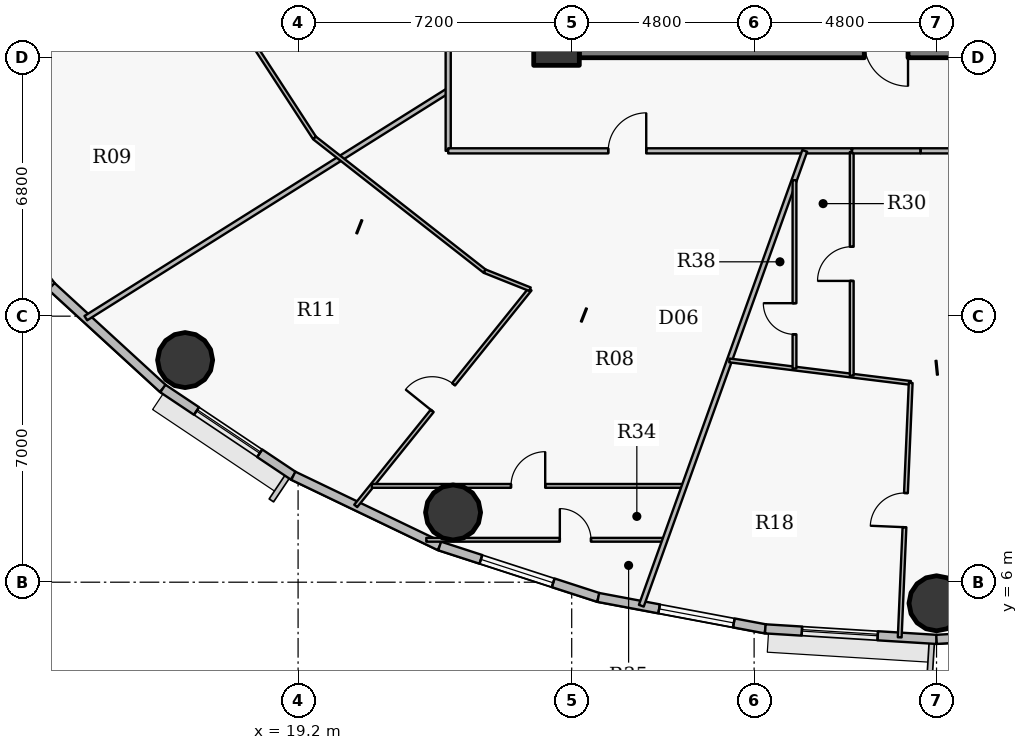
"""IFC4 building model, lengths in metres.
Left out: names, types, materials, properties, quantities, classifications, styles, units other than length and angle.
Written with IfcOpenShell. Run it as: python <this file> out.ifc"""

import sys

from ifc_helpers import new_model, si_unit, direction, frame, frame_2d, origin, origin_2d, place, context, subcontext, project, spatial, rectangle, hollow_circle, extrude, source, transform, mapped, element, fill, save


model = new_model("IFC4")
c1 = context("Model", 3, precision=1e-05, world=origin(), true_north=direction((0.0, 1.0)))
c2 = subcontext(c1, "Body", "Model", "MODEL_VIEW")
j1 = project(units=[si_unit("LENGTHUNIT", "METRE"), si_unit("PLANEANGLEUNIT", "RADIAN")], contexts=[c1])
p1 = place(None, origin())
s1 = spatial("IfcSite", under=j1, at=p1, CompositionType="ELEMENT")
p2 = place(p1, origin())
s2 = spatial("IfcBuilding", under=s1, at=p2, CompositionType="ELEMENT")
p3 = place(p2, frame((0.0, 0.0, 115.95)))
s3 = spatial("IfcBuildingStorey", under=s2, at=p3, CompositionType="ELEMENT", Elevation=115.95)
p4 = place(p3, frame((26.0, 20.2, 0.0), z_axis=(0.0, 0.0, 1.0), x_axis=(1.0, 0.0, 0.0)))
e1 = element("IfcColumn", 1, at=p4, inside=s3, PredefinedType="COLUMN", context=c2, shape_type="SweptSolid", body=[
    extrude(rectangle(XDim=1.2, YDim=1.2, at=origin_2d()), origin(), (0.0, 0.0, 1.0), 3.75),
])
p5 = place(p3, frame((45.4, 20.2, 0.0), z_axis=(0.0, 0.0, 1.0), x_axis=(-1.0, 0.0, 0.0)))
e2 = element("IfcWall", 2, at=p5, inside=s3, PredefinedType="SHEAR", context=c2, shape_type="SweptSolid", body=[
    extrude(rectangle(XDim=18.8, YDim=0.8, at=frame_2d((9.4, 0.0))), origin(), (0.0, 0.0, 1.0), 2.95),
])
p6 = place(p5, frame((10.15, 0.0, 0.0)))
e3 = element("IfcOpeningElement", 3, at=p6, cuts=e2, PredefinedType="OPENING", context=c2, shape_type="SweptSolid", body=[
    extrude(rectangle(XDim=1.15, YDim=2.15, at=origin_2d()), frame((0.575, 0.41, 1.075), z_axis=(0.0, -1.0, 0.0), x_axis=(1.0, 0.0, 0.0)), (0.0, 0.0, 1.0), 0.82),
])
for number, where, z_axis, x_axis in (
    (4, (16.227, 11.844, 0.0), (0.0, 0.0, 1.0), (1.0, 0.0, 0.0)),
    (5, (23.278, 7.835, 0.0), (0.0, 0.0, 1.0), (1.0, 0.0, 0.0)),
    (6, (36.0, 5.445, 0.0), (0.0, 0.0, 1.0), (1.0, 0.0, 0.0)),
):
    element("IfcColumn", number, at=place(p3, frame(where, z_axis=z_axis, x_axis=x_axis)), inside=s3, PredefinedType="COLUMN", context=c2, shape_type="SweptSolid", body=[
        extrude(hollow_circle(Radius=0.725, WallThickness=0.042, at=origin_2d()), origin(), (0.0, 0.0, 1.0), 3.75),
    ])
p7 = place(p3, frame((12.711, 13.783, 0.0), z_axis=(0.0, 0.0, 1.0), x_axis=(-0.616272103517, 0.787533297345, 0.0)))
e7 = element("IfcWall", 7, at=p7, inside=s3, PredefinedType="SOLIDWALL", context=c2, shape_type="SweptSolid", body=[
    extrude(rectangle(XDim=3.823, YDim=0.24, at=frame_2d((1.912, 0.0))), origin(), (0.0, 0.0, 1.0), 3.5),
])
p8 = place(p7, frame((0.912, 0.0, 0.9)))
e8 = element("IfcOpeningElement", 8, at=p8, cuts=e7, PredefinedType="OPENING", context=c2, shape_type="SweptSolid", body=[
    extrude(rectangle(XDim=2.0, YDim=1.75, at=origin_2d()), frame((1.0, 0.13, 0.875), z_axis=(0.0, -1.0, 0.0), x_axis=(1.0, 0.0, 0.0)), (0.0, 0.0, 1.0), 0.26),
])
p9 = place(p3, frame((15.642, 11.097, 0.0), z_axis=(0.0, 0.0, 1.0), x_axis=(-0.737113356241, 0.675769117414, 0.0)))
e9 = element("IfcWall", 9, at=p9, inside=s3, PredefinedType="SOLIDWALL", context=c2, shape_type="SweptSolid", body=[
    extrude(rectangle(XDim=3.976, YDim=0.24, at=frame_2d((1.988, 0.0))), origin(), (0.0, 0.0, 1.0), 3.5),
])
p10 = place(p3, frame((19.075, 8.801, 0.0), z_axis=(0.0, 0.0, 1.0), x_axis=(-0.831221811447, 0.555940914284, 0.0)))
e10 = element("IfcWall", 10, at=p10, inside=s3, PredefinedType="SOLIDWALL", context=c2, shape_type="SweptSolid", body=[
    extrude(rectangle(XDim=4.13, YDim=0.24, at=frame_2d((2.065, 0.0))), origin(), (0.0, 0.0, 1.0), 3.5),
])
p11 = place(p10, frame((1.065, 0.0, 0.9)))
e11 = element("IfcOpeningElement", 11, at=p11, cuts=e10, PredefinedType="OPENING", context=c2, shape_type="SweptSolid", body=[
    extrude(rectangle(XDim=2.0, YDim=1.75, at=origin_2d()), frame((1.0, 0.13, 0.875), z_axis=(0.0, -1.0, 0.0), x_axis=(1.0, 0.0, 0.0)), (0.0, 0.0, 1.0), 0.26),
])
p12 = place(p3, frame((22.926, 6.953, 0.0), z_axis=(0.0, 0.0, 1.0), x_axis=(-0.901589935876, 0.432591709962, 0.0)))
e12 = element("IfcWall", 12, at=p12, inside=s3, PredefinedType="SOLIDWALL", context=c2, shape_type="SweptSolid", body=[
    extrude(rectangle(XDim=4.272, YDim=0.24, at=frame_2d((2.136, 0.0))), origin(), (0.0, 0.0, 1.0), 3.5),
])
p13 = place(p3, frame((27.1, 5.599, 0.0), z_axis=(0.0, 0.0, 1.0), x_axis=(-0.951211346073, 0.308540070495, 0.0)))
e13 = element("IfcWall", 13, at=p13, inside=s3, PredefinedType="SOLIDWALL", context=c2, shape_type="SweptSolid", body=[
    extrude(rectangle(XDim=4.388, YDim=0.24, at=frame_2d((2.194, 0.0))), origin(), (0.0, 0.0, 1.0), 3.5),
])
p14 = place(p13, frame((1.248, 0.0, 0.9)))
e14 = element("IfcOpeningElement", 14, at=p14, cuts=e13, PredefinedType="OPENING", context=c2, shape_type="SweptSolid", body=[
    extrude(rectangle(XDim=2.0, YDim=1.75, at=origin_2d()), frame((1.0, 0.13, 0.875), z_axis=(0.0, -1.0, 0.0), x_axis=(1.0, 0.0, 0.0)), (0.0, 0.0, 1.0), 0.26),
])
p15 = place(p3, frame((31.494, 4.773, 0.0), z_axis=(0.0, 0.0, 1.0), x_axis=(-0.982789252177, 0.184730305596, 0.0)))
e15 = element("IfcWall", 15, at=p15, inside=s3, PredefinedType="SOLIDWALL", context=c2, shape_type="SweptSolid", body=[
    extrude(rectangle(XDim=4.471, YDim=0.24, at=frame_2d((2.235, 0.0))), origin(), (0.0, 0.0, 1.0), 3.5),
])
p16 = place(p15, frame((0.843, 0.0, 0.9)))
e16 = element("IfcOpeningElement", 16, at=p16, cuts=e15, PredefinedType="OPENING", context=c2, shape_type="SweptSolid", body=[
    extrude(rectangle(XDim=2.0, YDim=1.75, at=origin_2d()), frame((1.0, 0.13, 0.875), z_axis=(0.0, -1.0, 0.0), x_axis=(1.0, 0.0, 0.0)), (0.0, 0.0, 1.0), 0.26),
])
p17 = place(p3, frame((36.0, 4.495, 0.0), z_axis=(0.0, 0.0, 1.0), x_axis=(-0.998107531589, 0.061492726276, 0.0)))
e17 = element("IfcWall", 17, at=p17, inside=s3, PredefinedType="SOLIDWALL", context=c2, shape_type="SweptSolid", body=[
    extrude(rectangle(XDim=4.514, YDim=0.24, at=frame_2d((2.257, 0.0))), origin(), (0.0, 0.0, 1.0), 3.5),
])
p18 = place(p17, frame((1.55, 0.0, 0.9)))
e18 = element("IfcOpeningElement", 18, at=p18, cuts=e17, PredefinedType="OPENING", context=c2, shape_type="SweptSolid", body=[
    extrude(rectangle(XDim=2.0, YDim=1.75, at=origin_2d()), frame((1.0, 0.13, 0.875), z_axis=(0.0, -1.0, 0.0), x_axis=(1.0, 0.0, 0.0)), (0.0, 0.0, 1.0), 0.26),
])
p19 = place(p3, frame((40.506, 4.773, 0.0), z_axis=(0.0, 0.0, 1.0), x_axis=(-0.998107531589, -0.061492726276, 0.0)))
e19 = element("IfcWall", 19, at=p19, inside=s3, PredefinedType="SOLIDWALL", context=c2, shape_type="SweptSolid", body=[
    extrude(rectangle(XDim=4.514, YDim=0.24, at=frame_2d((2.257, 0.0))), origin(), (0.0, 0.0, 1.0), 3.5),
])
p20 = place(p19, frame((1.257, 0.0, 0.9)))
e20 = element("IfcOpeningElement", 20, at=p20, cuts=e19, PredefinedType="OPENING", context=c2, shape_type="SweptSolid", body=[
    extrude(rectangle(XDim=2.0, YDim=1.75, at=origin_2d()), frame((1.0, 0.13, 0.875), z_axis=(0.0, -1.0, 0.0), x_axis=(1.0, 0.0, 0.0)), (0.0, 0.0, 1.0), 0.26),
])
p21 = place(p3, frame((8.763, 19.792, 0.0), z_axis=(0.0, 0.0, 1.0), x_axis=(0.96671793708, 0.255844542893, 0.0)))
e21 = element("IfcWall", 21, at=p21, inside=s3, PredefinedType="PARTITIONING", context=c2, shape_type="SweptSolid", body=[
    extrude(rectangle(XDim=8.385, YDim=0.1, at=frame_2d((4.192, 0.0))), origin(), (0.0, 0.0, 1.0), 2.935),
])
p22 = place(p21, frame((4.835, 0.0, 0.0)))
e22 = element("IfcOpeningElement", 22, at=p22, cuts=e21, PredefinedType="OPENING", context=c2, shape_type="SweptSolid", body=[
    extrude(rectangle(XDim=0.9, YDim=2.1, at=origin_2d()), frame((0.45, 0.06, 1.05), z_axis=(0.0, -1.0, 0.0), x_axis=(1.0, 0.0, 0.0)), (0.0, 0.0, 1.0), 0.12),
])
p23 = place(p3, frame((13.615, 12.948, 0.0), z_axis=(0.0, 0.0, 1.0), x_axis=(0.846963568038, 0.531650932866, 0.0)))
e23 = element("IfcWall", 23, at=p23, inside=s3, PredefinedType="PARTITIONING", context=c2, shape_type="SweptSolid", body=[
    extrude(rectangle(XDim=11.258, YDim=0.135, at=frame_2d((5.629, 0.0))), origin(), (0.0, 0.0, 1.0), 2.935),
])
p24 = place(p3, frame((16.869, 21.937, 0.0), z_axis=(0.0, 0.0, 1.0), x_axis=(0.545394651961, -0.838179380331, 0.0)))
e24 = element("IfcWall", 24, at=p24, inside=s3, PredefinedType="PARTITIONING", context=c2, shape_type="SweptSolid", body=[
    extrude(rectangle(XDim=5.068, YDim=0.1, at=frame_2d((2.534, 0.0))), origin(), (0.0, 0.0, 1.0), 3.5),
])
p25 = place(p3, frame((19.634, 17.689, 0.0), z_axis=(0.0, 0.0, 1.0), x_axis=(0.787333679705, -0.616527109544, 0.0)))
e25 = element("IfcWall", 25, at=p25, inside=s3, PredefinedType="PARTITIONING", context=c2, shape_type="SweptSolid", body=[
    extrude(rectangle(XDim=5.685, YDim=0.1, at=frame_2d((2.842, 0.0))), origin(), (0.0, 0.0, 1.0), 2.935),
])
p26 = place(p3, frame((20.717, 8.007, 0.0), z_axis=(0.0, 0.0, 1.0), x_axis=(0.626926430663, 0.779078462375, 0.0)))
e26 = element("IfcWall", 26, at=p26, inside=s3, PredefinedType="PARTITIONING", context=c2, shape_type="SweptSolid", body=[
    extrude(rectangle(XDim=7.317, YDim=0.1, at=frame_2d((3.658, 0.0))), origin(), (0.0, 0.0, 1.0), 2.935),
])
p27 = place(p26, frame((3.208, 0.0, 0.0)))
e27 = element("IfcOpeningElement", 27, at=p27, cuts=e26, PredefinedType="OPENING", context=c2, shape_type="SweptSolid", body=[
    extrude(rectangle(XDim=0.9, YDim=2.1, at=origin_2d()), frame((0.45, 0.06, 1.05), z_axis=(0.0, -1.0, 0.0), x_axis=(1.0, 0.0, 0.0)), (0.0, 0.0, 1.0), 0.12),
])
p28 = place(p3, frame((21.141, 8.534, 0.0), z_axis=(0.0, 0.0, 1.0), x_axis=(1.0, 0.0, 0.0)))
e28 = element("IfcWall", 28, at=p28, inside=s3, PredefinedType="PARTITIONING", context=c2, shape_type="SweptSolid", body=[
    extrude(rectangle(XDim=8.224, YDim=0.1, at=frame_2d((4.112, 0.0))), origin(), (0.0, 0.0, 1.0), 2.935),
])
p29 = place(p28, frame((3.662, 0.0, 0.0)))
e29 = element("IfcOpeningElement", 29, at=p29, cuts=e28, PredefinedType="OPENING", context=c2, shape_type="SweptSolid", body=[
    extrude(rectangle(XDim=0.9, YDim=2.1, at=origin_2d()), frame((0.45, 0.06, 1.05), z_axis=(0.0, -1.0, 0.0), x_axis=(1.0, 0.0, 0.0)), (0.0, 0.0, 1.0), 0.12),
])
p30 = place(p3, frame((22.574, 7.116, 0.0), z_axis=(0.0, 0.0, 1.0), x_axis=(1.0, 0.0, 0.0)))
e30 = element("IfcWall", 30, at=p30, inside=s3, PredefinedType="PARTITIONING", context=c2, shape_type="SweptSolid", body=[
    extrude(rectangle(XDim=6.281, YDim=0.1, at=frame_2d((3.141, 0.0))), origin(), (0.0, 0.0, 1.0), 2.935),
])
p31 = place(p30, frame((3.514, 0.0, 0.0)))
e31 = element("IfcOpeningElement", 31, at=p31, cuts=e30, PredefinedType="OPENING", context=c2, shape_type="SweptSolid", body=[
    extrude(rectangle(XDim=0.82, YDim=2.1, at=origin_2d()), frame((0.41, 0.06, 1.05), z_axis=(0.0, -1.0, 0.0), x_axis=(1.0, 0.0, 0.0)), (0.0, 0.0, 1.0), 0.12),
])
p32 = place(p3, frame((23.15, 17.35, 0.0), z_axis=(0.0, 0.0, 1.0), x_axis=(0.0, 1.0, 0.0)))
e32 = element("IfcWall", 32, at=p32, inside=s3, PredefinedType="PARTITIONING", context=c2, shape_type="SweptSolid", body=[
    extrude(rectangle(XDim=19.3, YDim=0.135, at=frame_2d((9.65, 0.0))), origin(), (0.0, 0.0, 1.0), 2.935),
])
p33 = place(p32, frame((16.264, 0.0, 0.0)))
e33 = element("IfcOpeningElement", 33, at=p33, cuts=e32, PredefinedType="OPENING", context=c2, shape_type="SweptSolid", body=[
    extrude(rectangle(XDim=1.0, YDim=2.15, at=origin_2d()), frame((0.5, 0.078, 1.075), z_axis=(0.0, -1.0, 0.0), x_axis=(1.0, 0.0, 0.0)), (0.0, 0.0, 1.0), 0.155),
])
p34 = place(p32, frame((7.426, 0.0, 0.0)))
e34 = element("IfcOpeningElement", 34, at=p34, cuts=e32, PredefinedType="OPENING", context=c2, shape_type="SweptSolid", body=[
    extrude(rectangle(XDim=1.0, YDim=2.15, at=origin_2d()), frame((0.5, 0.078, 1.075), z_axis=(0.0, -1.0, 0.0), x_axis=(1.0, 0.0, 0.0)), (0.0, 0.0, 1.0), 0.155),
])
p35 = place(p3, frame((23.15, 17.35, 0.0), z_axis=(0.0, 0.0, 1.0), x_axis=(1.0, 0.0, 0.0)))
e35 = element("IfcWall", 35, at=p35, inside=s3, PredefinedType="PARTITIONING", context=c2, shape_type="SweptSolid", body=[
    extrude(rectangle(XDim=10.619, YDim=0.135, at=frame_2d((5.31, 0.0))), origin(), (0.0, 0.0, 1.0), 2.935),
])
p36 = place(p35, frame((4.211, 0.0, 0.0)))
e36 = element("IfcOpeningElement", 36, at=p36, cuts=e35, PredefinedType="OPENING", context=c2, shape_type="SweptSolid", body=[
    extrude(rectangle(XDim=1.0, YDim=2.15, at=origin_2d()), frame((0.5, 0.078, 1.075), z_axis=(0.0, -1.0, 0.0), x_axis=(1.0, 0.0, 0.0)), (0.0, 0.0, 1.0), 0.155),
])
p37 = place(p3, frame((24.109, 14.184, 0.0), z_axis=(0.0, 0.0, 1.0), x_axis=(0.928816677888, -0.370539578017, 0.0)))
e37 = element("IfcWall", 37, at=p37, inside=s3, PredefinedType="PARTITIONING", context=c2, shape_type="SweptSolid", body=[
    extrude(rectangle(XDim=1.286, YDim=0.1, at=frame_2d((0.643, 0.0))), origin(), (0.0, 0.0, 1.0), 3.185),
])
p38 = place(p3, frame((28.232, 5.381, 0.0), z_axis=(0.0, 0.0, 1.0), x_axis=(0.338158615332, 0.941089130145, 0.0)))
e38 = element("IfcWall", 38, at=p38, inside=s3, PredefinedType="PARTITIONING", context=c2, shape_type="SweptSolid", body=[
    extrude(rectangle(XDim=12.718, YDim=0.135, at=frame_2d((6.359, 0.0))), origin(), (0.0, 0.0, 1.0), 2.935),
])
p39 = place(p3, frame((30.551, 11.835, 0.0), z_axis=(0.0, 0.0, 1.0), x_axis=(0.992401646286, -0.123040531728, 0.0)))
e39 = element("IfcWall", 39, at=p39, inside=s3, PredefinedType="PARTITIONING", context=c2, shape_type="SweptSolid", body=[
    extrude(rectangle(XDim=4.806, YDim=0.1, at=frame_2d((2.403, 0.0))), origin(), (0.0, 0.0, 1.0), 3.5),
])
p40 = place(p3, frame((32.262, 11.623, 0.0), z_axis=(0.0, 0.0, 1.0), x_axis=(0.0, 1.0, 0.0)))
e40 = element("IfcWall", 40, at=p40, inside=s3, PredefinedType="PARTITIONING", context=c2, shape_type="SweptSolid", body=[
    extrude(rectangle(XDim=4.955, YDim=0.1, at=frame_2d((2.478, 0.0))), origin(), (0.0, 0.0, 1.0), 3.5),
])
p41 = place(p40, frame((0.899, 0.0, 0.0)))
e41 = element("IfcOpeningElement", 41, at=p41, cuts=e40, PredefinedType="OPENING", context=c2, shape_type="SweptSolid", body=[
    extrude(rectangle(XDim=0.82, YDim=2.1, at=origin_2d()), frame((0.41, 0.06, 1.05), z_axis=(0.0, -1.0, 0.0), x_axis=(1.0, 0.0, 0.0)), (0.0, 0.0, 1.0), 0.12),
])
p42 = place(p3, frame((33.769, 11.436, 0.0), z_axis=(0.0, 0.0, 1.0), x_axis=(0.0, 1.0, 0.0)))
e42 = element("IfcWall", 42, at=p42, inside=s3, PredefinedType="PARTITIONING", context=c2, shape_type="SweptSolid", body=[
    extrude(rectangle(XDim=5.884, YDim=0.1, at=frame_2d((2.942, 0.0))), origin(), (0.0, 0.0, 1.0), 3.5),
])
p43 = place(p42, frame((2.492, 0.0, 0.0)))
e43 = element("IfcOpeningElement", 43, at=p43, cuts=e42, PredefinedType="OPENING", context=c2, shape_type="SweptSolid", body=[
    extrude(rectangle(XDim=0.9, YDim=2.1, at=origin_2d()), frame((0.45, 0.06, 1.05), z_axis=(0.0, -1.0, 0.0), x_axis=(1.0, 0.0, 0.0)), (0.0, 0.0, 1.0), 0.12),
])
p44 = place(p3, frame((35.031, 4.55, 0.0), z_axis=(0.0, 0.0, 1.0), x_axis=(0.043108301027, 0.999070405118, 0.0)))
e44 = element("IfcWall", 44, at=p44, inside=s3, PredefinedType="PARTITIONING", context=c2, shape_type="SweptSolid", body=[
    extrude(rectangle(XDim=6.7, YDim=0.1, at=frame_2d((3.35, 0.0))), origin(), (0.0, 0.0, 1.0), 2.935),
])
p45 = place(p44, frame((2.9, 0.0, 0.0)))
e45 = element("IfcOpeningElement", 45, at=p45, cuts=e44, PredefinedType="OPENING", context=c2, shape_type="SweptSolid", body=[
    extrude(rectangle(XDim=0.9, YDim=2.1, at=origin_2d()), frame((0.45, 0.06, 1.05), z_axis=(0.0, -1.0, 0.0), x_axis=(1.0, 0.0, 0.0)), (0.0, 0.0, 1.0), 0.12),
])
p46 = place(p3, frame((35.584, 17.35, 0.0), z_axis=(0.0, 0.0, 1.0), x_axis=(1.0, 0.0, 0.0)))
e46 = element("IfcWall", 46, at=p46, inside=s3, PredefinedType="PARTITIONING", context=c2, shape_type="SweptSolid", body=[
    extrude(rectangle(XDim=13.266, YDim=0.135, at=frame_2d((6.633, 0.0))), origin(), (0.0, 0.0, 1.0), 2.935),
])
p47 = place(p46, frame((2.757, 0.0, 0.0)))
e47 = element("IfcOpeningElement", 47, at=p47, cuts=e46, PredefinedType="OPENING", context=c2, shape_type="SweptSolid", body=[
    extrude(rectangle(XDim=1.0, YDim=2.15, at=origin_2d()), frame((0.5, 0.078, 1.075), z_axis=(0.0, -1.0, 0.0), x_axis=(1.0, 0.0, 0.0)), (0.0, 0.0, 1.0), 0.155),
])
p48 = place(p3, frame((35.574, 17.35, 0.0), z_axis=(0.0, 0.0, 1.0), x_axis=(-1.0, 0.0, 0.0)))
e48 = element("IfcWall", 48, at=p48, inside=s3, PredefinedType="PARTITIONING", context=c2, shape_type="SweptSolid", body=[
    extrude(rectangle(XDim=1.795, YDim=0.135, at=frame_2d((0.897, 0.0))), origin(), (0.0, 0.0, 1.0), 3.5),
])
p49 = place(p3, frame((25.6, 20.79, 0.0), z_axis=(0.0, 0.0, 1.0), x_axis=(0.0, -1.0, 0.0)))
e49 = element("IfcWall", 49, at=p49, inside=s3, PredefinedType="PARTITIONING", context=c2, shape_type="SweptSolid", body=[
    extrude(rectangle(XDim=0.99, YDim=0.135, at=frame_2d((0.495, 0.0))), origin(), (0.0, 0.0, 1.0), 3.5),
])
p50 = place(p3, frame((25.907, 19.8, 0.0), z_axis=(0.0, 0.0, 1.0), x_axis=(1.0, 0.0, 0.0)))
e50 = element("IfcWall", 50, at=p50, inside=s3, PredefinedType="PARTITIONING", context=c2, shape_type="SweptSolid", body=[
    extrude(rectangle(XDim=0.683, YDim=0.135, at=frame_2d((0.341, 0.0))), origin(), (0.0, 0.0, 1.0), 2.935),
])
m1 = source(origin(), c2, "Body", "SweptSolid", [
    extrude(rectangle(XDim=2.0, YDim=1.75, at=origin_2d()), frame((1.0, 0.03, 0.875), z_axis=(0.0, -1.0, 0.0), x_axis=(1.0, 0.0, 0.0)), (0.0, 0.0, 1.0), 0.06),
])
p51 = place(p11, origin())
e51 = element("IfcWindow", 51, at=p51, inside=s3, PartitioningType="DOUBLE_PANEL_VERTICAL", PredefinedType="WINDOW", context=c2, shape_type="MappedRepresentation", body=[
    mapped(m1, transform((0.0, 0.0, 0.0), x_axis=(1.0, 0.0, 0.0), y_axis=(0.0, 1.0, 0.0), z_axis=(0.0, 0.0, 1.0), scale=1.0)),
])
fill(e11, e51)
p52 = place(p14, origin())
e52 = element("IfcWindow", 52, at=p52, inside=s3, PartitioningType="DOUBLE_PANEL_VERTICAL", PredefinedType="WINDOW", context=c2, shape_type="MappedRepresentation", body=[
    mapped(m1, transform((0.0, 0.0, 0.0), x_axis=(1.0, 0.0, 0.0), y_axis=(0.0, 1.0, 0.0), z_axis=(0.0, 0.0, 1.0), scale=1.0)),
])
fill(e14, e52)
p53 = place(p16, origin())
e53 = element("IfcWindow", 53, at=p53, inside=s3, PartitioningType="DOUBLE_PANEL_VERTICAL", PredefinedType="WINDOW", context=c2, shape_type="MappedRepresentation", body=[
    mapped(m1, transform((0.0, 0.0, 0.0), x_axis=(1.0, 0.0, 0.0), y_axis=(0.0, 1.0, 0.0), z_axis=(0.0, 0.0, 1.0), scale=1.0)),
])
fill(e16, e53)
p54 = place(p18, origin())
e54 = element("IfcWindow", 54, at=p54, inside=s3, PartitioningType="DOUBLE_PANEL_VERTICAL", PredefinedType="WINDOW", context=c2, shape_type="MappedRepresentation", body=[
    mapped(m1, transform((0.0, 0.0, 0.0), x_axis=(1.0, 0.0, 0.0), y_axis=(0.0, 1.0, 0.0), z_axis=(0.0, 0.0, 1.0), scale=1.0)),
])
fill(e18, e54)
m2 = source(origin(), c2, "Body", "SweptSolid", [
    extrude(rectangle(XDim=1.0, YDim=2.15, at=origin_2d()), frame((0.5, 0.025, 1.075), z_axis=(0.0, -1.0, 0.0), x_axis=(1.0, 0.0, 0.0)), (0.0, 0.0, 1.0), 0.05),
])
p55 = place(p36, origin())
e55 = element("IfcDoor", 55, at=p55, inside=s3, OperationType="SINGLE_SWING_RIGHT", PredefinedType="DOOR", context=c2, shape_type="MappedRepresentation", body=[
    mapped(m2, transform((0.0, 0.0, 0.0), x_axis=(1.0, 0.0, 0.0), y_axis=(0.0, 1.0, 0.0), z_axis=(0.0, 0.0, 1.0), scale=1.0)),
])
fill(e36, e55)
m3 = source(origin(), c2, "Body", "SweptSolid", [
    extrude(rectangle(XDim=0.9, YDim=2.1, at=origin_2d()), frame((0.45, 0.025, 1.05), z_axis=(0.0, -1.0, 0.0), x_axis=(1.0, 0.0, 0.0)), (0.0, 0.0, 1.0), 0.05),
])
p56 = place(p27, origin())
e56 = element("IfcDoor", 56, at=p56, inside=s3, OperationType="SINGLE_SWING_LEFT", PredefinedType="DOOR", context=c2, shape_type="MappedRepresentation", body=[
    mapped(m3, transform((0.0, 0.0, 0.0), x_axis=(1.0, 0.0, 0.0), y_axis=(0.0, 1.0, 0.0), z_axis=(0.0, 0.0, 1.0), scale=1.0)),
])
fill(e27, e56)
p57 = place(p29, origin())
e57 = element("IfcDoor", 57, at=p57, inside=s3, OperationType="SINGLE_SWING_RIGHT", PredefinedType="DOOR", context=c2, shape_type="MappedRepresentation", body=[
    mapped(m3, transform((0.0, 0.0, 0.0), x_axis=(1.0, 0.0, 0.0), y_axis=(0.0, 1.0, 0.0), z_axis=(0.0, 0.0, 1.0), scale=1.0)),
])
fill(e29, e57)
m4 = source(origin(), c2, "Body", "SweptSolid", [
    extrude(rectangle(XDim=0.82, YDim=2.1, at=origin_2d()), frame((0.41, 0.025, 1.05), z_axis=(0.0, -1.0, 0.0), x_axis=(1.0, 0.0, 0.0)), (0.0, 0.0, 1.0), 0.05),
])
p58 = place(p31, origin())
e58 = element("IfcDoor", 58, at=p58, inside=s3, OperationType="SINGLE_SWING_LEFT", PredefinedType="DOOR", context=c2, shape_type="MappedRepresentation", body=[
    mapped(m4, transform((0.0, 0.0, 0.0), x_axis=(1.0, 0.0, 0.0), y_axis=(0.0, 1.0, 0.0), z_axis=(0.0, 0.0, 1.0), scale=1.0)),
])
fill(e31, e58)
p59 = place(p45, origin())
e59 = element("IfcDoor", 59, at=p59, inside=s3, OperationType="SINGLE_SWING_LEFT", PredefinedType="DOOR", context=c2, shape_type="MappedRepresentation", body=[
    mapped(m3, transform((0.0, 0.0, 0.0), x_axis=(1.0, 0.0, 0.0), y_axis=(0.0, 1.0, 0.0), z_axis=(0.0, 0.0, 1.0), scale=1.0)),
])
fill(e45, e59)
p60 = place(p43, origin())
e60 = element("IfcDoor", 60, at=p60, inside=s3, OperationType="SINGLE_SWING_LEFT", PredefinedType="DOOR", context=c2, shape_type="MappedRepresentation", body=[
    mapped(m3, transform((0.0, 0.0, 0.0), x_axis=(1.0, 0.0, 0.0), y_axis=(0.0, 1.0, 0.0), z_axis=(0.0, 0.0, 1.0), scale=1.0)),
])
fill(e43, e60)
p61 = place(p41, origin())
e61 = element("IfcDoor", 61, at=p61, inside=s3, OperationType="SINGLE_SWING_RIGHT", PredefinedType="DOOR", context=c2, shape_type="MappedRepresentation", body=[
    mapped(m4, transform((0.0, 0.0, 0.0), x_axis=(1.0, 0.0, 0.0), y_axis=(0.0, 1.0, 0.0), z_axis=(0.0, 0.0, 1.0), scale=1.0)),
])
fill(e41, e61)
save(model, sys.argv[1])
